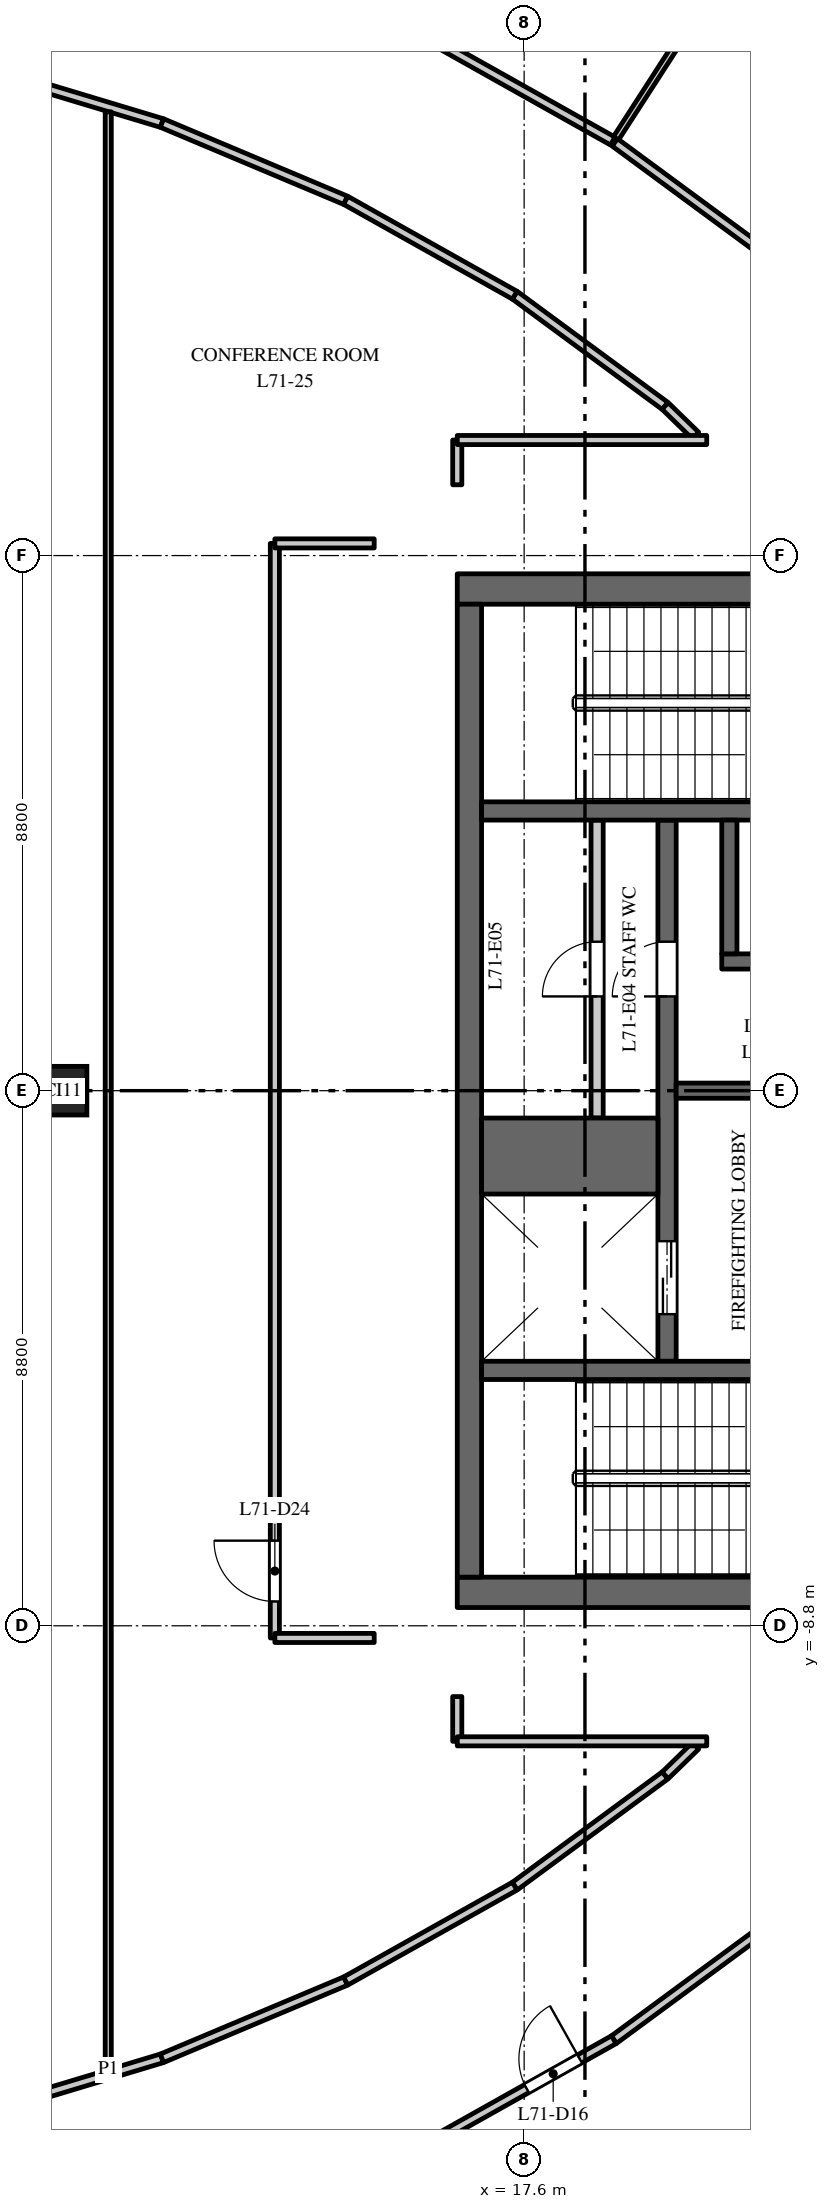
"""IFC4 building model, lengths in metres.
Left out: names, types, materials, properties, quantities, classifications, styles, units other than length and angle.
Written with IfcOpenShell. Run it as: python <this file> out.ifc"""

import sys

from ifc_helpers import new_model, si_unit, direction, frame, frame_2d, origin, origin_2d, place, context, subcontext, project, spatial, rectangle, extrude, element, fill, save


model = new_model("IFC4")
c1 = context("Model", 3, precision=1e-05, world=origin(), true_north=direction((0.0, 1.0)))
c2 = subcontext(c1, "Body", "Model", "MODEL_VIEW")
j1 = project(units=[si_unit("LENGTHUNIT", "METRE"), si_unit("PLANEANGLEUNIT", "RADIAN")], contexts=[c1])
p1 = place(None, origin())
s1 = spatial("IfcSite", under=j1, at=p1, CompositionType="ELEMENT")
p2 = place(p1, origin())
s2 = spatial("IfcBuilding", under=s1, at=p2, CompositionType="ELEMENT")
p3 = place(p2, frame((0.0, 0.0, 327.0)))
s3 = spatial("IfcBuildingStorey", under=s2, at=p3, CompositionType="ELEMENT", Elevation=327.0)
p4 = place(p3, frame((10.008, 0.0, 0.0), z_axis=(0.0, 0.0, 1.0), x_axis=(0.0, 1.0, 0.0)))
e1 = element("IfcColumn", 1, at=p4, inside=s3, PredefinedType="COLUMN", context=c2, shape_type="SweptSolid", body=[
    extrude(rectangle(XDim=0.8, YDim=0.8, at=origin_2d()), origin(), (0.0, 0.0, 1.0), 4.0),
])
p5 = place(p3, frame((16.5, 8.25, 0.0), z_axis=(0.0, 0.0, 1.0), x_axis=(1.0, 0.0, 0.0)))
e2 = element("IfcWall", 2, at=p5, inside=s3, PredefinedType="SHEAR", context=c2, shape_type="SweptSolid", body=[
    extrude(rectangle(XDim=15.0, YDim=0.5, at=frame_2d((7.5, 0.0))), origin(), (0.0, 0.0, 1.0), 3.7),
])
p6 = place(p5, frame((6.9, 0.0, 0.0)))
e3 = element("IfcOpeningElement", 3, at=p6, cuts=e2, PredefinedType="OPENING", context=c2, shape_type="SweptSolid", body=[
    extrude(rectangle(XDim=1.2, YDim=2.1, at=frame_2d((0.6, 1.05))), frame((0.0, 0.26, 0.0), z_axis=(0.0, -1.0, 0.0), x_axis=(1.0, 0.0, 0.0)), (0.0, 0.0, 1.0), 0.52),
])
p7 = place(p5, frame((12.95, 0.0, 0.0)))
e4 = element("IfcOpeningElement", 4, at=p7, cuts=e2, PredefinedType="OPENING", context=c2, shape_type="SweptSolid", body=[
    extrude(rectangle(XDim=0.9, YDim=2.1, at=frame_2d((0.45, 1.05))), frame((0.0, 0.26, 0.0), z_axis=(0.0, -1.0, 0.0), x_axis=(1.0, 0.0, 0.0)), (0.0, 0.0, 1.0), 0.52),
])
p8 = place(p3, frame((16.5, -8.25, 0.0), z_axis=(0.0, 0.0, 1.0), x_axis=(1.0, 0.0, 0.0)))
e5 = element("IfcWall", 5, at=p8, inside=s3, PredefinedType="SHEAR", context=c2, shape_type="SweptSolid", body=[
    extrude(rectangle(XDim=15.0, YDim=0.5, at=frame_2d((7.5, 0.0))), origin(), (0.0, 0.0, 1.0), 3.7),
])
p9 = place(p8, frame((6.9, 0.0, 0.0)))
e6 = element("IfcOpeningElement", 6, at=p9, cuts=e5, PredefinedType="OPENING", context=c2, shape_type="SweptSolid", body=[
    extrude(rectangle(XDim=1.2, YDim=2.1, at=frame_2d((0.6, 1.05))), frame((0.0, 0.26, 0.0), z_axis=(0.0, -1.0, 0.0), x_axis=(1.0, 0.0, 0.0)), (0.0, 0.0, 1.0), 0.52),
])
p10 = place(p8, frame((12.275, 0.0, 0.0)))
e7 = element("IfcOpeningElement", 7, at=p10, cuts=e5, PredefinedType="OPENING", context=c2, shape_type="SweptSolid", body=[
    extrude(rectangle(XDim=0.9, YDim=2.1, at=frame_2d((0.45, 1.05))), frame((0.0, 0.26, 0.0), z_axis=(0.0, -1.0, 0.0), x_axis=(1.0, 0.0, 0.0)), (0.0, 0.0, 1.0), 0.52),
])
p11 = place(p3, frame((18.8, -0.45, 0.0), z_axis=(0.0, 0.0, 1.0), x_axis=(0.0, 1.0, 0.0)))
e8 = element("IfcWall", 8, at=p11, inside=s3, PredefinedType="PARTITIONING", context=c2, shape_type="SweptSolid", body=[
    extrude(rectangle(XDim=4.9, YDim=0.2, at=frame_2d((2.45, 0.0))), origin(), (0.0, 0.0, 1.0), 3.7),
])
p12 = place(p11, frame((2.0, 0.0, 0.0)))
e9 = element("IfcOpeningElement", 9, at=p12, cuts=e8, PredefinedType="OPENING", context=c2, shape_type="SweptSolid", body=[
    extrude(rectangle(XDim=0.9, YDim=2.1, at=frame_2d((0.45, 1.05))), frame((0.0, 0.11, 0.0), z_axis=(0.0, -1.0, 0.0), x_axis=(1.0, 0.0, 0.0)), (0.0, 0.0, 1.0), 0.22),
])
p13 = place(p3, frame((19.95, -4.45, 0.0), z_axis=(0.0, 0.0, 1.0), x_axis=(0.0, 1.0, 0.0)))
e10 = element("IfcWall", 10, at=p13, inside=s3, PredefinedType="SHEAR", context=c2, shape_type="SweptSolid", body=[
    extrude(rectangle(XDim=8.9, YDim=0.3, at=frame_2d((4.45, 0.0))), origin(), (0.0, 0.0, 1.0), 3.7),
])
p14 = place(p13, frame((0.775, 0.0, 0.0)))
e11 = element("IfcOpeningElement", 11, at=p14, cuts=e10, PredefinedType="OPENING", context=c2, shape_type="SweptSolid", body=[
    extrude(rectangle(XDim=1.2, YDim=2.1, at=frame_2d((0.6, 1.05))), frame((0.0, 0.16, 0.0), z_axis=(0.0, -1.0, 0.0), x_axis=(1.0, 0.0, 0.0)), (0.0, 0.0, 1.0), 0.32),
])
p15 = place(p13, frame((6.0, 0.0, 0.0)))
e12 = element("IfcOpeningElement", 12, at=p15, cuts=e10, PredefinedType="OPENING", context=c2, shape_type="SweptSolid", body=[
    extrude(rectangle(XDim=0.9, YDim=2.1, at=frame_2d((0.45, 1.05))), frame((0.0, 0.16, 0.0), z_axis=(0.0, -1.0, 0.0), x_axis=(1.0, 0.0, 0.0)), (0.0, 0.0, 1.0), 0.32),
])
p16 = place(p3, frame((20.1, 0.0, 0.0), z_axis=(0.0, 0.0, 1.0), x_axis=(1.0, 0.0, 0.0)))
e13 = element("IfcWall", 13, at=p16, inside=s3, PredefinedType="SHEAR", context=c2, shape_type="SweptSolid", body=[
    extrude(rectangle(XDim=3.28, YDim=0.25, at=frame_2d((1.64, 0.0))), origin(), (0.0, 0.0, 1.0), 3.7),
])
p17 = place(p3, frame((16.7, -8.0, 0.0), z_axis=(0.0, 0.0, 1.0), x_axis=(0.0, 1.0, 0.0)))
e14 = element("IfcWall", 14, at=p17, inside=s3, PredefinedType="SHEAR", context=c2, shape_type="SweptSolid", body=[
    extrude(rectangle(XDim=16.0, YDim=0.4, at=frame_2d((8.0, 0.0))), origin(), (0.0, 0.0, 1.0), 3.7),
])
p18 = place(p3, frame((16.9, -1.075, 0.0), z_axis=(0.0, 0.0, 1.0), x_axis=(1.0, 0.0, 0.0)))
e15 = element("IfcWall", 15, at=p18, inside=s3, PredefinedType="SHEAR", context=c2, shape_type="SweptSolid", body=[
    extrude(rectangle(XDim=2.9, YDim=1.25, at=frame_2d((1.45, 0.0))), origin(), (0.0, 0.0, 1.0), 3.7),
])
p19 = place(p3, frame((16.9, 4.6, 0.0), z_axis=(0.0, 0.0, 1.0), x_axis=(1.0, 0.0, 0.0)))
e16 = element("IfcWall", 16, at=p19, inside=s3, PredefinedType="SHEAR", context=c2, shape_type="SweptSolid", body=[
    extrude(rectangle(XDim=6.18, YDim=0.3, at=frame_2d((3.09, 0.0))), origin(), (0.0, 0.0, 1.0), 3.7),
])
p20 = place(p19, frame((4.9, 0.0, 0.0)))
e17 = element("IfcOpeningElement", 17, at=p20, cuts=e16, PredefinedType="OPENING", context=c2, shape_type="SweptSolid", body=[
    extrude(rectangle(XDim=1.1, YDim=2.1, at=frame_2d((0.55, 1.05))), frame((0.0, 0.16, 0.0), z_axis=(0.0, -1.0, 0.0), x_axis=(1.0, 0.0, 0.0)), (0.0, 0.0, 1.0), 0.32),
])
p21 = place(p3, frame((16.9, -4.6, 0.0), z_axis=(0.0, 0.0, 1.0), x_axis=(1.0, 0.0, 0.0)))
e18 = element("IfcWall", 18, at=p21, inside=s3, PredefinedType="SHEAR", context=c2, shape_type="SweptSolid", body=[
    extrude(rectangle(XDim=6.18, YDim=0.3, at=frame_2d((3.09, 0.0))), origin(), (0.0, 0.0, 1.0), 3.7),
])
p22 = place(p21, frame((4.9, 0.0, 0.0)))
e19 = element("IfcOpeningElement", 19, at=p22, cuts=e18, PredefinedType="OPENING", context=c2, shape_type="SweptSolid", body=[
    extrude(rectangle(XDim=1.1, YDim=2.1, at=frame_2d((0.55, 1.05))), frame((0.0, 0.16, 0.0), z_axis=(0.0, -1.0, 0.0), x_axis=(1.0, 0.0, 0.0)), (0.0, 0.0, 1.0), 0.32),
])
p23 = place(p3, frame((20.85, 2.125, 0.0), z_axis=(0.0, 0.0, 1.0), x_axis=(1.0, 0.0, 0.0)))
e20 = element("IfcWall", 20, at=p23, inside=s3, PredefinedType="SHEAR", context=c2, shape_type="SweptSolid", body=[
    extrude(rectangle(XDim=2.53, YDim=0.25, at=frame_2d((1.265, 0.0))), origin(), (0.0, 0.0, 1.0), 3.7),
])
p24 = place(p3, frame((20.975, 2.25, 0.0), z_axis=(0.0, 0.0, 1.0), x_axis=(0.0, 1.0, 0.0)))
e21 = element("IfcWall", 21, at=p24, inside=s3, PredefinedType="SHEAR", context=c2, shape_type="SweptSolid", body=[
    extrude(rectangle(XDim=2.2, YDim=0.25, at=frame_2d((1.1, 0.0))), origin(), (0.0, 0.0, 1.0), 3.7),
])
for number, where, z_axis, x_axis in (
    (22, (8.44, -16.877, 0.0), (0.0, 0.0, 1.0), (0.958, 0.288, 0.0)),
    (23, (8.44, 16.877, 0.0), (0.0, 0.0, 1.0), (0.958, -0.288, 0.0)),
):
    element("IfcWall", number, at=place(p3, frame(where, z_axis=z_axis, x_axis=x_axis)), inside=s3, PredefinedType="PARTITIONING", context=c2, shape_type="SweptSolid", body=[
        extrude(rectangle(XDim=3.345, YDim=0.15, at=frame_2d((1.672, 0.0))), origin(), (0.0, 0.0, 1.0), 2.85),
    ])
p25 = place(p3, frame((10.76, -16.097, 0.0), z_axis=(0.0, 0.0, 1.0), x_axis=(0.0, 1.0, 0.0)))
e24 = element("IfcWall", 24, at=p25, inside=s3, PredefinedType="PARTITIONING", context=c2, shape_type="SweptSolid", body=[
    extrude(rectangle(XDim=32.194, YDim=0.1, at=frame_2d((16.097, 0.0))), origin(), (0.0, 0.0, 1.0), 2.75),
])
for number, where, z_axis, x_axis in (
    (25, (11.643, -15.913, 0.0), (0.0, 0.0, 1.0), (0.922, 0.388, 0.0)),
    (26, (11.643, 15.913, 0.0), (0.0, 0.0, 1.0), (0.922, -0.388, 0.0)),
):
    element("IfcWall", number, at=place(p3, frame(where, z_axis=z_axis, x_axis=x_axis)), inside=s3, PredefinedType="PARTITIONING", context=c2, shape_type="SweptSolid", body=[
        extrude(rectangle(XDim=3.278, YDim=0.15, at=frame_2d((1.639, 0.0))), origin(), (0.0, 0.0, 1.0), 3.7),
    ])
p26 = place(p3, frame((13.5, -9.0, 0.0), z_axis=(0.0, 0.0, 1.0), x_axis=(0.0, 1.0, 0.0)))
e27 = element("IfcWall", 27, at=p26, inside=s3, PredefinedType="PARTITIONING", context=c2, shape_type="SweptSolid", body=[
    extrude(rectangle(XDim=18.0, YDim=0.15, at=frame_2d((9.0, 0.0))), origin(), (0.0, 0.0, 1.0), 2.75),
])
p27 = place(p26, frame((0.6, 0.0, 0.0)))
e28 = element("IfcOpeningElement", 28, at=p27, cuts=e27, PredefinedType="OPENING", context=c2, shape_type="SweptSolid", body=[
    extrude(rectangle(XDim=1.0, YDim=2.1, at=frame_2d((0.5, 1.05))), frame((0.0, 0.085, 0.0), z_axis=(0.0, -1.0, 0.0), x_axis=(1.0, 0.0, 0.0)), (0.0, 0.0, 1.0), 0.17),
])
for number, where, z_axis, x_axis in (
    (29, (13.5, -9.0, 0.0), (0.0, 0.0, 1.0), (1.0, 0.0, 0.0)),
    (30, (13.5, 9.0, 0.0), (0.0, 0.0, 1.0), (1.0, 0.0, 0.0)),
):
    element("IfcWall", number, at=place(p3, frame(where, z_axis=z_axis, x_axis=x_axis)), inside=s3, PredefinedType="PARTITIONING", context=c2, shape_type="SweptSolid", body=[
        extrude(rectangle(XDim=1.634, YDim=0.15, at=frame_2d((0.817, 0.0))), origin(), (0.0, 0.0, 1.0), 3.7),
    ])
for number, where, z_axis, x_axis in (
    (31, (14.665, -14.642, 0.0), (0.0, 0.0, 1.0), (0.872, 0.489, 0.0)),
    (32, (14.665, 14.642, 0.0), (0.0, 0.0, 1.0), (0.872, -0.489, 0.0)),
):
    element("IfcWall", number, at=place(p3, frame(where, z_axis=z_axis, x_axis=x_axis)), inside=s3, PredefinedType="PARTITIONING", context=c2, shape_type="SweptSolid", body=[
        extrude(rectangle(XDim=3.188, YDim=0.15, at=frame_2d((1.594, 0.0))), origin(), (0.0, 0.0, 1.0), 3.7),
    ])
p28 = place(p3, frame((15.985, 17.342, 0.0), z_axis=(0.0, 0.0, 1.0), x_axis=(0.871912158543, -0.489662320161, 0.0)))
e33 = element("IfcWall", 33, at=p28, inside=s3, PredefinedType="PARTITIONING", context=c2, shape_type="SweptSolid", body=[
    extrude(rectangle(XDim=3.523, YDim=0.15, at=frame_2d((1.761, 0.0))), origin(), (0.0, 0.0, 1.0), 3.7),
])
p29 = place(p3, frame((16.002, -17.332, 0.0), z_axis=(0.0, 0.0, 1.0), x_axis=(0.871995198984, 0.489514425679, 0.0)))
e34 = element("IfcWall", 34, at=p29, inside=s3, PredefinedType="PARTITIONING", context=c2, shape_type="SweptSolid", body=[
    extrude(rectangle(XDim=3.524, YDim=0.15, at=frame_2d((1.762, 0.0))), origin(), (0.0, 0.0, 1.0), 3.7),
])
p30 = place(p29, frame((1.88, 0.0, 0.0)))
e35 = element("IfcOpeningElement", 35, at=p30, cuts=e34, PredefinedType="OPENING", context=c2, shape_type="SweptSolid", body=[
    extrude(rectangle(XDim=1.0, YDim=2.1, at=frame_2d((0.5, 1.05))), frame((0.0, 0.085, 0.0), z_axis=(0.0, -1.0, 0.0), x_axis=(1.0, 0.0, 0.0)), (0.0, 0.0, 1.0), 0.17),
])
p31 = place(p3, frame((16.5, -10.7, 0.0), z_axis=(0.0, 0.0, 1.0), x_axis=(0.0, 1.0, 0.0)))
e36 = element("IfcWall", 36, at=p31, inside=s3, PredefinedType="PARTITIONING", context=c2, shape_type="SweptSolid", body=[
    extrude(rectangle(XDim=0.736, YDim=0.15, at=frame_2d((0.368, 0.0))), origin(), (0.0, 0.0, 1.0), 3.7),
])
p32 = place(p3, frame((16.5, -10.7, 0.0), z_axis=(0.0, 0.0, 1.0), x_axis=(1.0, 0.0, 0.0)))
e37 = element("IfcWall", 37, at=p32, inside=s3, PredefinedType="PARTITIONING", context=c2, shape_type="SweptSolid", body=[
    extrude(rectangle(XDim=4.103, YDim=0.15, at=frame_2d((2.052, 0.0))), origin(), (0.0, 0.0, 1.0), 2.75),
])
p33 = place(p3, frame((16.5, 9.964, 0.0), z_axis=(0.0, 0.0, 1.0), x_axis=(0.0, 1.0, 0.0)))
e38 = element("IfcWall", 38, at=p33, inside=s3, PredefinedType="PARTITIONING", context=c2, shape_type="SweptSolid", body=[
    extrude(rectangle(XDim=0.736, YDim=0.15, at=frame_2d((0.368, 0.0))), origin(), (0.0, 0.0, 1.0), 3.7),
])
p34 = place(p3, frame((16.5, 10.7, 0.0), z_axis=(0.0, 0.0, 1.0), x_axis=(1.0, 0.0, 0.0)))
e39 = element("IfcWall", 39, at=p34, inside=s3, PredefinedType="PARTITIONING", context=c2, shape_type="SweptSolid", body=[
    extrude(rectangle(XDim=4.103, YDim=0.15, at=frame_2d((2.052, 0.0))), origin(), (0.0, 0.0, 1.0), 2.75),
])
for number, where, z_axis, x_axis in (
    (40, (17.445, -13.082, 0.0), (0.0, 0.0, 1.0), (0.805, 0.593, 0.0)),
    (41, (17.445, 13.082, 0.0), (0.0, 0.0, 1.0), (0.805, -0.593, 0.0)),
):
    element("IfcWall", number, at=place(p3, frame(where, z_axis=z_axis, x_axis=x_axis)), inside=s3, PredefinedType="PARTITIONING", context=c2, shape_type="SweptSolid", body=[
        extrude(rectangle(XDim=3.073, YDim=0.15, at=frame_2d((1.536, 0.0))), origin(), (0.0, 0.0, 1.0), 3.7),
    ])
p35 = place(p3, frame((19.075, -15.607, 0.0), z_axis=(0.0, 0.0, 1.0), x_axis=(0.805248975221, 0.59293683298, 0.0)))
e42 = element("IfcWall", 42, at=p35, inside=s3, PredefinedType="PARTITIONING", context=c2, shape_type="SweptSolid", body=[
    extrude(rectangle(XDim=3.462, YDim=0.15, at=frame_2d((1.731, 0.0))), origin(), (0.0, 0.0, 1.0), 3.7),
])
p36 = place(p3, frame((19.077, 15.61, 0.0), z_axis=(0.0, 0.0, 1.0), x_axis=(0.54223713958, 0.840225496197, 0.0)))
e43 = element("IfcWall", 43, at=p36, inside=s3, PredefinedType="PARTITIONING", context=c2, shape_type="SweptSolid", body=[
    extrude(rectangle(XDim=7.06, YDim=0.1, at=frame_2d((3.53, 0.0))), origin(), (0.0, 0.0, 1.0), 3.7),
])
p37 = place(p3, frame((19.091, 15.595, 0.0), z_axis=(0.0, 0.0, 1.0), x_axis=(0.80526257364, -0.592918364949, 0.0)))
e44 = element("IfcWall", 44, at=p37, inside=s3, PredefinedType="PARTITIONING", context=c2, shape_type="SweptSolid", body=[
    extrude(rectangle(XDim=3.442, YDim=0.15, at=frame_2d((1.721, 0.0))), origin(), (0.0, 0.0, 1.0), 3.7),
])
for number, where, z_axis, x_axis in (
    (45, (19.919, -11.26, 0.0), (0.0, 0.0, 1.0), (0.717, 0.697, 0.0)),
    (46, (19.919, 11.26, 0.0), (0.0, 0.0, 1.0), (0.717, -0.697, 0.0)),
):
    element("IfcWall", number, at=place(p3, frame(where, z_axis=z_axis, x_axis=x_axis)), inside=s3, PredefinedType="PARTITIONING", context=c2, shape_type="SweptSolid", body=[
        extrude(rectangle(XDim=0.696, YDim=0.15, at=frame_2d((0.348, 0.0))), origin(), (0.0, 0.0, 1.0), 2.75),
    ])
p38 = place(p14, origin())
e47 = element("IfcDoor", 47, at=p38, inside=s3, OperationType="DOUBLE_DOOR_SLIDING", PredefinedType="DOOR", context=c2, shape_type="SweptSolid", body=[
    extrude(rectangle(XDim=1.2, YDim=2.1, at=frame_2d((0.6, 1.05))), frame((0.0, 0.025, 0.0), z_axis=(0.0, -1.0, 0.0), x_axis=(1.0, 0.0, 0.0)), (0.0, 0.0, 1.0), 0.05),
])
fill(e11, e47)
p39 = place(p15, origin())
e48 = element("IfcDoor", 48, at=p39, inside=s3, OperationType="SINGLE_SWING_RIGHT", PredefinedType="DOOR", context=c2, shape_type="SweptSolid", body=[
    extrude(rectangle(XDim=0.9, YDim=2.1, at=frame_2d((0.45, 1.05))), frame((0.0, 0.025, 0.0), z_axis=(0.0, -1.0, 0.0), x_axis=(1.0, 0.0, 0.0)), (0.0, 0.0, 1.0), 0.05),
])
fill(e12, e48)
p40 = place(p12, origin())
e49 = element("IfcDoor", 49, at=p40, inside=s3, OperationType="SINGLE_SWING_RIGHT", PredefinedType="DOOR", context=c2, shape_type="SweptSolid", body=[
    extrude(rectangle(XDim=0.9, YDim=2.1, at=frame_2d((0.45, 1.05))), frame((0.0, 0.025, 0.0), z_axis=(0.0, -1.0, 0.0), x_axis=(1.0, 0.0, 0.0)), (0.0, 0.0, 1.0), 0.05),
])
fill(e9, e49)
p41 = place(p30, origin())
e50 = element("IfcDoor", 50, at=p41, inside=s3, OperationType="SINGLE_SWING_RIGHT", PredefinedType="DOOR", context=c2, shape_type="SweptSolid", body=[
    extrude(rectangle(XDim=1.0, YDim=2.1, at=frame_2d((0.5, 1.05))), frame((0.0, 0.025, 0.0), z_axis=(0.0, -1.0, 0.0), x_axis=(1.0, 0.0, 0.0)), (0.0, 0.0, 1.0), 0.05),
])
fill(e35, e50)
p42 = place(p27, origin())
e51 = element("IfcDoor", 51, at=p42, inside=s3, OperationType="SINGLE_SWING_RIGHT", PredefinedType="DOOR", context=c2, shape_type="SweptSolid", body=[
    extrude(rectangle(XDim=1.0, YDim=2.1, at=frame_2d((0.5, 1.05))), frame((0.0, 0.025, 0.0), z_axis=(0.0, -1.0, 0.0), x_axis=(1.0, 0.0, 0.0)), (0.0, 0.0, 1.0), 0.05),
])
fill(e28, e51)
save(model, sys.argv[1])
